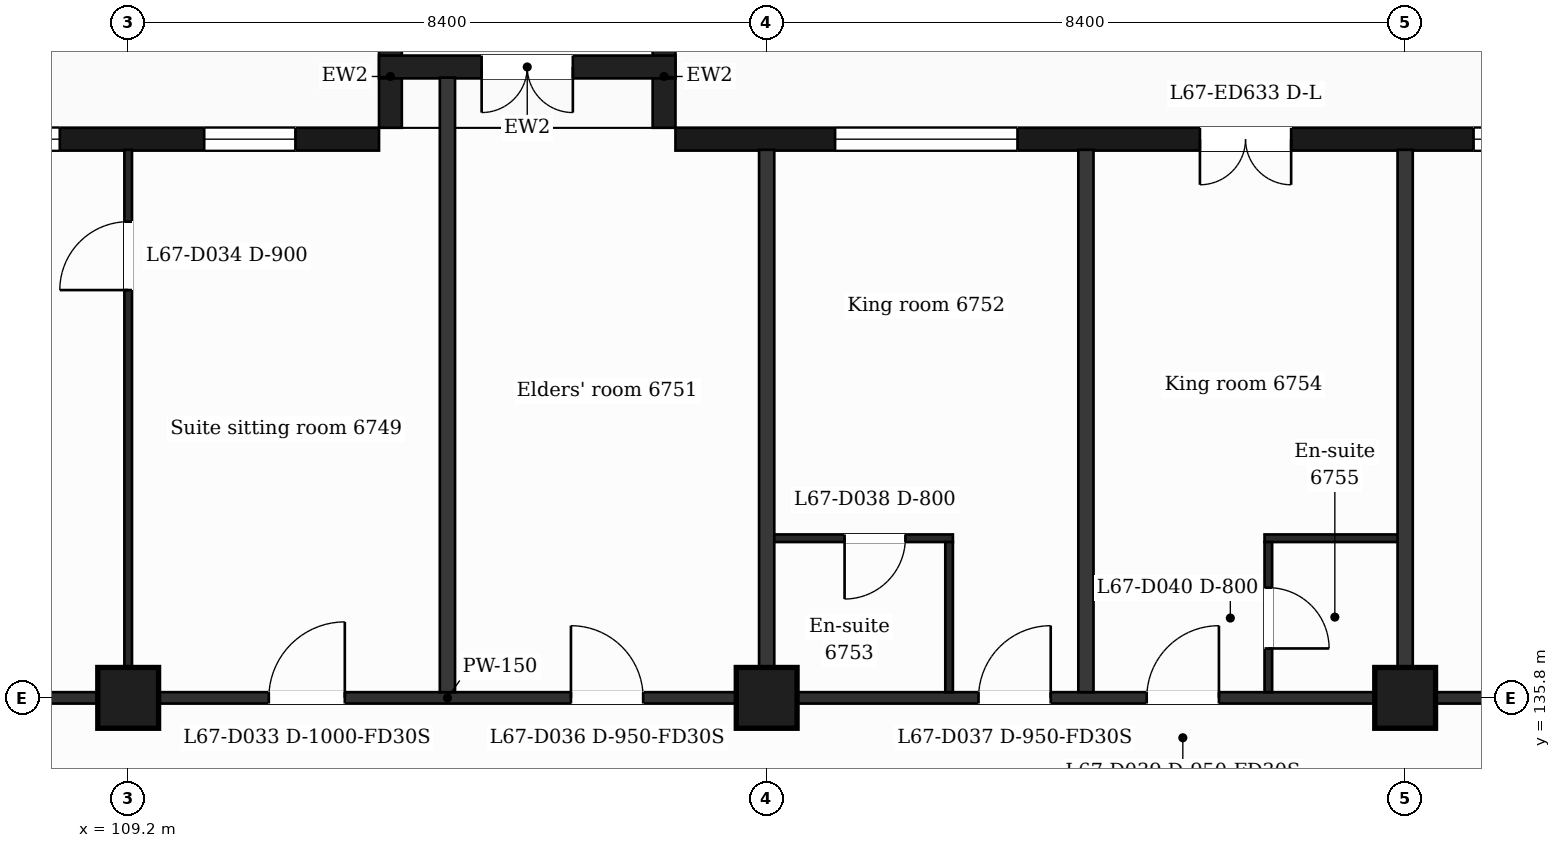
"""IFC4 building model, lengths in metres.
Left out: names, types, materials, properties, quantities, classifications, styles, units other than length and angle.
Written with IfcOpenShell. Run it as: python <this file> out.ifc"""

import sys

from ifc_helpers import new_model, si_unit, direction, frame, frame_2d, origin, origin_2d, place, context, subcontext, project, spatial, rectangle, extrude, element, fill, save


model = new_model("IFC4")
c1 = context("Model", 3, precision=1e-05, world=origin(), true_north=direction((0.0, 1.0)))
c2 = subcontext(c1, "Body", "Model", "MODEL_VIEW")
j1 = project(units=[si_unit("LENGTHUNIT", "METRE"), si_unit("PLANEANGLEUNIT", "RADIAN")], contexts=[c1])
p1 = place(None, origin())
s1 = spatial("IfcSite", under=j1, at=p1, CompositionType="ELEMENT")
p2 = place(p1, origin())
s2 = spatial("IfcBuilding", under=s1, at=p2, CompositionType="ELEMENT")
p3 = place(p2, frame((0.0, 0.0, 277.5)))
s3 = spatial("IfcBuildingStorey", under=s2, at=p3, CompositionType="ELEMENT", Elevation=277.5)
for number, where, z_axis, x_axis in (
    (1, (109.2, 135.8, 0.0), (0.0, 0.0, 1.0), (1.0, 0.0, 0.0)),
    (2, (117.6, 135.8, 0.0), (0.0, 0.0, 1.0), (1.0, 0.0, 0.0)),
    (3, (126.0, 135.8, 0.0), (0.0, 0.0, 1.0), (1.0, 0.0, 0.0)),
):
    element("IfcColumn", number, at=place(p3, frame(where, z_axis=z_axis, x_axis=x_axis)), inside=s3, PredefinedType="COLUMN", context=c2, shape_type="SweptSolid", body=[
        extrude(rectangle(XDim=0.8, YDim=0.8, at=origin_2d()), origin(), (0.0, 0.0, 1.0), 3.7),
    ])
p4 = place(p3, frame((130.65, 143.15, 0.0), z_axis=(0.0, 0.0, 1.0), x_axis=(-1.0, 0.0, 0.0)))
e4 = element("IfcWall", 4, at=p4, inside=s3, PredefinedType="SOLIDWALL", context=c2, shape_type="SweptSolid", body=[
    extrude(rectangle(XDim=14.25, YDim=0.3, at=frame_2d((7.125, 0.0))), origin(), (0.0, 0.0, 1.0), 3.38),
])
p5 = place(p4, frame((1.35, 0.0, 0.9)))
e5 = element("IfcOpeningElement", 5, at=p5, cuts=e4, PredefinedType="OPENING", context=c2, shape_type="SweptSolid", body=[
    extrude(rectangle(XDim=2.4, YDim=2.1, at=frame_2d((1.2, 1.05))), frame((0.0, 0.16, 0.0), z_axis=(0.0, -1.0, 0.0), x_axis=(1.0, 0.0, 0.0)), (0.0, 0.0, 1.0), 0.32),
])
p6 = place(p4, frame((6.15, 0.0, 0.0)))
e6 = element("IfcOpeningElement", 6, at=p6, cuts=e4, PredefinedType="OPENING", context=c2, shape_type="SweptSolid", body=[
    extrude(rectangle(XDim=1.2, YDim=2.4, at=frame_2d((0.6, 1.2))), frame((0.0, 0.16, 0.0), z_axis=(0.0, -1.0, 0.0), x_axis=(1.0, 0.0, 0.0)), (0.0, 0.0, 1.0), 0.32),
])
p7 = place(p4, frame((9.75, 0.0, 0.9)))
e7 = element("IfcOpeningElement", 7, at=p7, cuts=e4, PredefinedType="OPENING", context=c2, shape_type="SweptSolid", body=[
    extrude(rectangle(XDim=2.4, YDim=2.1, at=frame_2d((1.2, 1.05))), frame((0.0, 0.16, 0.0), z_axis=(0.0, -1.0, 0.0), x_axis=(1.0, 0.0, 0.0)), (0.0, 0.0, 1.0), 0.32),
])
p8 = place(p3, frame((112.5, 143.15, 0.0), z_axis=(0.0, 0.0, 1.0), x_axis=(-1.0, 0.0, 0.0)))
e8 = element("IfcWall", 8, at=p8, inside=s3, PredefinedType="SOLIDWALL", context=c2, shape_type="SweptSolid", body=[
    extrude(rectangle(XDim=16.5, YDim=0.3, at=frame_2d((8.25, 0.0))), origin(), (0.0, 0.0, 1.0), 3.38),
])
p9 = place(p8, frame((1.1, 0.0, 0.9)))
e9 = element("IfcOpeningElement", 9, at=p9, cuts=e8, PredefinedType="OPENING", context=c2, shape_type="SweptSolid", body=[
    extrude(rectangle(XDim=1.2, YDim=2.1, at=frame_2d((0.6, 1.05))), frame((0.0, 0.16, 0.0), z_axis=(0.0, -1.0, 0.0), x_axis=(1.0, 0.0, 0.0)), (0.0, 0.0, 1.0), 0.32),
])
p10 = place(p8, frame((4.2, 0.0, 0.9)))
e10 = element("IfcOpeningElement", 10, at=p10, cuts=e8, PredefinedType="OPENING", context=c2, shape_type="SweptSolid", body=[
    extrude(rectangle(XDim=2.4, YDim=2.1, at=frame_2d((1.2, 1.05))), frame((0.0, 0.16, 0.0), z_axis=(0.0, -1.0, 0.0), x_axis=(1.0, 0.0, 0.0)), (0.0, 0.0, 1.0), 0.32),
])
p11 = place(p8, frame((8.4, 0.0, 0.9)))
e11 = element("IfcOpeningElement", 11, at=p11, cuts=e8, PredefinedType="OPENING", context=c2, shape_type="SweptSolid", body=[
    extrude(rectangle(XDim=2.4, YDim=2.1, at=frame_2d((1.2, 1.05))), frame((0.0, 0.16, 0.0), z_axis=(0.0, -1.0, 0.0), x_axis=(1.0, 0.0, 0.0)), (0.0, 0.0, 1.0), 0.32),
])
p12 = place(p8, frame((12.3, 0.0, 0.0)))
e12 = element("IfcOpeningElement", 12, at=p12, cuts=e8, PredefinedType="OPENING", context=c2, shape_type="SweptSolid", body=[
    extrude(rectangle(XDim=1.2, YDim=2.4, at=frame_2d((0.6, 1.2))), frame((0.0, 0.16, 0.0), z_axis=(0.0, -1.0, 0.0), x_axis=(1.0, 0.0, 0.0)), (0.0, 0.0, 1.0), 0.32),
])
p13 = place(p8, frame((14.1, 0.0, 0.9)))
e13 = element("IfcOpeningElement", 13, at=p13, cuts=e8, PredefinedType="OPENING", context=c2, shape_type="SweptSolid", body=[
    extrude(rectangle(XDim=1.2, YDim=2.1, at=frame_2d((0.6, 1.05))), frame((0.0, 0.16, 0.0), z_axis=(0.0, -1.0, 0.0), x_axis=(1.0, 0.0, 0.0)), (0.0, 0.0, 1.0), 0.32),
])
for number, where, z_axis, x_axis in (
    (14, (116.25, 143.3, 0.0), (0.0, 0.0, 1.0), (0.0, 1.0, 0.0)),
    (15, (112.65, 143.3, 0.0), (0.0, 0.0, 1.0), (0.0, 1.0, 0.0)),
):
    element("IfcWall", number, at=place(p3, frame(where, z_axis=z_axis, x_axis=x_axis)), inside=s3, PredefinedType="SOLIDWALL", context=c2, shape_type="SweptSolid", body=[
        extrude(rectangle(XDim=1.35, YDim=0.3, at=frame_2d((0.675, 0.0))), origin(), (0.0, 0.0, 1.0), 3.38),
    ])
p14 = place(p3, frame((116.4, 144.1, 0.0), z_axis=(0.0, 0.0, 1.0), x_axis=(-1.0, 0.0, 0.0)))
e16 = element("IfcWall", 16, at=p14, inside=s3, PredefinedType="SOLIDWALL", context=c2, shape_type="SweptSolid", body=[
    extrude(rectangle(XDim=3.9, YDim=0.3, at=frame_2d((1.95, 0.0))), origin(), (0.0, 0.0, 1.0), 3.38),
])
p15 = place(p14, frame((1.35, 0.0, 0.0)))
e17 = element("IfcOpeningElement", 17, at=p15, cuts=e16, PredefinedType="OPENING", context=c2, shape_type="SweptSolid", body=[
    extrude(rectangle(XDim=1.2, YDim=2.4, at=frame_2d((0.6, 1.2))), frame((0.0, 0.16, 0.0), z_axis=(0.0, -1.0, 0.0), x_axis=(1.0, 0.0, 0.0)), (0.0, 0.0, 1.0), 0.32),
])
p16 = place(p3, frame((90.895, 135.8, 0.0), z_axis=(0.0, 0.0, 1.0), x_axis=(1.0, 0.0, 0.0)))
e18 = element("IfcWall", 18, at=p16, inside=s3, PredefinedType="PARTITIONING", context=c2, shape_type="SweptSolid", body=[
    extrude(rectangle(XDim=45.011, YDim=0.15, at=frame_2d((22.505, 0.0))), origin(), (0.0, 0.0, 1.0), 3.38),
])
p17 = place(p16, frame((8.005, 0.0, 0.0)))
e19 = element("IfcOpeningElement", 19, at=p17, cuts=e18, PredefinedType="OPENING", context=c2, shape_type="SweptSolid", body=[
    extrude(rectangle(XDim=1.0, YDim=2.1, at=frame_2d((0.5, 1.05))), frame((0.0, 0.085, 0.0), z_axis=(0.0, -1.0, 0.0), x_axis=(1.0, 0.0, 0.0)), (0.0, 0.0, 1.0), 0.17),
])
p18 = place(p16, frame((10.515, 0.0, 0.0)))
e20 = element("IfcOpeningElement", 20, at=p18, cuts=e18, PredefinedType="OPENING", context=c2, shape_type="SweptSolid", body=[
    extrude(rectangle(XDim=1.0, YDim=2.1, at=frame_2d((0.5, 1.05))), frame((0.0, 0.085, 0.0), z_axis=(0.0, -1.0, 0.0), x_axis=(1.0, 0.0, 0.0)), (0.0, 0.0, 1.0), 0.17),
])
p19 = place(p16, frame((20.156, 0.0, 0.0)))
e21 = element("IfcOpeningElement", 21, at=p19, cuts=e18, PredefinedType="OPENING", context=c2, shape_type="SweptSolid", body=[
    extrude(rectangle(XDim=1.0, YDim=2.1, at=frame_2d((0.5, 1.05))), frame((0.0, 0.085, 0.0), z_axis=(0.0, -1.0, 0.0), x_axis=(1.0, 0.0, 0.0)), (0.0, 0.0, 1.0), 0.17),
])
p20 = place(p16, frame((24.13, 0.0, 0.0)))
e22 = element("IfcOpeningElement", 22, at=p20, cuts=e18, PredefinedType="OPENING", context=c2, shape_type="SweptSolid", body=[
    extrude(rectangle(XDim=0.95, YDim=2.1, at=frame_2d((0.475, 1.05))), frame((0.0, 0.085, 0.0), z_axis=(0.0, -1.0, 0.0), x_axis=(1.0, 0.0, 0.0)), (0.0, 0.0, 1.0), 0.17),
])
p21 = place(p16, frame((29.492, 0.0, 0.0)))
e23 = element("IfcOpeningElement", 23, at=p21, cuts=e18, PredefinedType="OPENING", context=c2, shape_type="SweptSolid", body=[
    extrude(rectangle(XDim=0.95, YDim=2.1, at=frame_2d((0.475, 1.05))), frame((0.0, 0.085, 0.0), z_axis=(0.0, -1.0, 0.0), x_axis=(1.0, 0.0, 0.0)), (0.0, 0.0, 1.0), 0.17),
])
p22 = place(p16, frame((31.705, 0.0, 0.0)))
e24 = element("IfcOpeningElement", 24, at=p22, cuts=e18, PredefinedType="OPENING", context=c2, shape_type="SweptSolid", body=[
    extrude(rectangle(XDim=0.95, YDim=2.1, at=frame_2d((0.475, 1.05))), frame((0.0, 0.085, 0.0), z_axis=(0.0, -1.0, 0.0), x_axis=(1.0, 0.0, 0.0)), (0.0, 0.0, 1.0), 0.17),
])
p23 = place(p16, frame((39.814, 0.0, 0.0)))
e25 = element("IfcOpeningElement", 25, at=p23, cuts=e18, PredefinedType="OPENING", context=c2, shape_type="SweptSolid", body=[
    extrude(rectangle(XDim=0.95, YDim=2.1, at=frame_2d((0.475, 1.05))), frame((0.0, 0.085, 0.0), z_axis=(0.0, -1.0, 0.0), x_axis=(1.0, 0.0, 0.0)), (0.0, 0.0, 1.0), 0.17),
])
p24 = place(p3, frame((117.6, 137.9, 0.0), z_axis=(0.0, 0.0, 1.0), x_axis=(1.0, 0.0, 0.0)))
e26 = element("IfcWall", 26, at=p24, inside=s3, PredefinedType="PARTITIONING", context=c2, shape_type="SweptSolid", body=[
    extrude(rectangle(XDim=2.45, YDim=0.1, at=frame_2d((1.225, 0.0))), origin(), (0.0, 0.0, 1.0), 3.38),
])
p25 = place(p24, frame((1.025, 0.0, 0.0)))
e27 = element("IfcOpeningElement", 27, at=p25, cuts=e26, PredefinedType="OPENING", context=c2, shape_type="SweptSolid", body=[
    extrude(rectangle(XDim=0.8, YDim=2.1, at=frame_2d((0.4, 1.05))), frame((0.0, 0.06, 0.0), z_axis=(0.0, -1.0, 0.0), x_axis=(1.0, 0.0, 0.0)), (0.0, 0.0, 1.0), 0.12),
])
p26 = place(p3, frame((124.15, 137.9, 0.0), z_axis=(0.0, 0.0, 1.0), x_axis=(1.0, 0.0, 0.0)))
e28 = element("IfcWall", 28, at=p26, inside=s3, PredefinedType="PARTITIONING", context=c2, shape_type="SweptSolid", body=[
    extrude(rectangle(XDim=1.85, YDim=0.1, at=frame_2d((0.925, 0.0))), origin(), (0.0, 0.0, 1.0), 3.38),
])
p27 = place(p3, frame((109.2, 135.875, 0.0), z_axis=(0.0, 0.0, 1.0), x_axis=(0.0, 1.0, 0.0)))
e29 = element("IfcWall", 29, at=p27, inside=s3, PredefinedType="PARTITIONING", context=c2, shape_type="SweptSolid", body=[
    extrude(rectangle(XDim=7.135, YDim=0.1, at=frame_2d((3.567, 0.0))), origin(), (0.0, 0.0, 1.0), 3.38),
])
p28 = place(p27, frame((5.29, 0.0, 0.0)))
e30 = element("IfcOpeningElement", 30, at=p28, cuts=e29, PredefinedType="OPENING", context=c2, shape_type="SweptSolid", body=[
    extrude(rectangle(XDim=0.9, YDim=2.1, at=frame_2d((0.45, 1.05))), frame((0.0, 0.06, 0.0), z_axis=(0.0, -1.0, 0.0), x_axis=(1.0, 0.0, 0.0)), (0.0, 0.0, 1.0), 0.12),
])
p29 = place(p3, frame((113.4, 135.875, 0.0), z_axis=(0.0, 0.0, 1.0), x_axis=(0.0, 1.0, 0.0)))
e31 = element("IfcWall", 31, at=p29, inside=s3, PredefinedType="PARTITIONING", context=c2, shape_type="SweptSolid", body=[
    extrude(rectangle(XDim=8.085, YDim=0.2, at=frame_2d((4.042, 0.0))), origin(), (0.0, 0.0, 1.0), 3.38),
])
p30 = place(p3, frame((117.6, 135.875, 0.0), z_axis=(0.0, 0.0, 1.0), x_axis=(0.0, 1.0, 0.0)))
e32 = element("IfcWall", 32, at=p30, inside=s3, PredefinedType="PARTITIONING", context=c2, shape_type="SweptSolid", body=[
    extrude(rectangle(XDim=7.135, YDim=0.2, at=frame_2d((3.567, 0.0))), origin(), (0.0, 0.0, 1.0), 3.38),
])
p31 = place(p3, frame((120.0, 135.875, 0.0), z_axis=(0.0, 0.0, 1.0), x_axis=(0.0, 1.0, 0.0)))
e33 = element("IfcWall", 33, at=p31, inside=s3, PredefinedType="PARTITIONING", context=c2, shape_type="SweptSolid", body=[
    extrude(rectangle(XDim=1.975, YDim=0.1, at=frame_2d((0.988, 0.0))), origin(), (0.0, 0.0, 1.0), 3.38),
])
p32 = place(p3, frame((121.8, 135.875, 0.0), z_axis=(0.0, 0.0, 1.0), x_axis=(0.0, 1.0, 0.0)))
e34 = element("IfcWall", 34, at=p32, inside=s3, PredefinedType="PARTITIONING", context=c2, shape_type="SweptSolid", body=[
    extrude(rectangle(XDim=7.135, YDim=0.2, at=frame_2d((3.567, 0.0))), origin(), (0.0, 0.0, 1.0), 3.38),
])
p33 = place(p3, frame((124.2, 135.875, 0.0), z_axis=(0.0, 0.0, 1.0), x_axis=(0.0, 1.0, 0.0)))
e35 = element("IfcWall", 35, at=p33, inside=s3, PredefinedType="PARTITIONING", context=c2, shape_type="SweptSolid", body=[
    extrude(rectangle(XDim=1.975, YDim=0.1, at=frame_2d((0.988, 0.0))), origin(), (0.0, 0.0, 1.0), 3.38),
])
p34 = place(p33, frame((0.575, 0.0, 0.0)))
e36 = element("IfcOpeningElement", 36, at=p34, cuts=e35, PredefinedType="OPENING", context=c2, shape_type="SweptSolid", body=[
    extrude(rectangle(XDim=0.8, YDim=2.1, at=frame_2d((0.4, 1.05))), frame((0.0, 0.06, 0.0), z_axis=(0.0, -1.0, 0.0), x_axis=(1.0, 0.0, 0.0)), (0.0, 0.0, 1.0), 0.12),
])
p35 = place(p3, frame((126.0, 135.875, 0.0), z_axis=(0.0, 0.0, 1.0), x_axis=(0.0, 1.0, 0.0)))
e37 = element("IfcWall", 37, at=p35, inside=s3, PredefinedType="PARTITIONING", context=c2, shape_type="SweptSolid", body=[
    extrude(rectangle(XDim=7.135, YDim=0.2, at=frame_2d((3.567, 0.0))), origin(), (0.0, 0.0, 1.0), 3.38),
])
p36 = place(p5, origin())
e38 = element("IfcWindow", 38, at=p36, inside=s3, PartitioningType="SINGLE_PANEL", PredefinedType="WINDOW", context=c2, shape_type="SweptSolid", body=[
    extrude(rectangle(XDim=2.4, YDim=2.1, at=frame_2d((1.2, 1.05))), frame((0.0, 0.03, 0.0), z_axis=(0.0, -1.0, 0.0), x_axis=(1.0, 0.0, 0.0)), (0.0, 0.0, 1.0), 0.06),
])
fill(e5, e38)
p37 = place(p6, origin())
e39 = element("IfcDoor", 39, at=p37, inside=s3, OperationType="DOUBLE_DOOR_SINGLE_SWING", PredefinedType="DOOR", context=c2, shape_type="SweptSolid", body=[
    extrude(rectangle(XDim=1.2, YDim=2.4, at=frame_2d((0.6, 1.2))), frame((0.0, 0.025, 0.0), z_axis=(0.0, -1.0, 0.0), x_axis=(1.0, 0.0, 0.0)), (0.0, 0.0, 1.0), 0.05),
])
fill(e6, e39)
p38 = place(p7, origin())
e40 = element("IfcWindow", 40, at=p38, inside=s3, PartitioningType="SINGLE_PANEL", PredefinedType="WINDOW", context=c2, shape_type="SweptSolid", body=[
    extrude(rectangle(XDim=2.4, YDim=2.1, at=frame_2d((1.2, 1.05))), frame((0.0, 0.03, 0.0), z_axis=(0.0, -1.0, 0.0), x_axis=(1.0, 0.0, 0.0)), (0.0, 0.0, 1.0), 0.06),
])
fill(e7, e40)
p39 = place(p9, origin())
e41 = element("IfcWindow", 41, at=p39, inside=s3, PartitioningType="SINGLE_PANEL", PredefinedType="WINDOW", context=c2, shape_type="SweptSolid", body=[
    extrude(rectangle(XDim=1.2, YDim=2.1, at=frame_2d((0.6, 1.05))), frame((0.0, 0.03, 0.0), z_axis=(0.0, -1.0, 0.0), x_axis=(1.0, 0.0, 0.0)), (0.0, 0.0, 1.0), 0.06),
])
fill(e9, e41)
p40 = place(p10, origin())
e42 = element("IfcWindow", 42, at=p40, inside=s3, PartitioningType="SINGLE_PANEL", PredefinedType="WINDOW", context=c2, shape_type="SweptSolid", body=[
    extrude(rectangle(XDim=2.4, YDim=2.1, at=frame_2d((1.2, 1.05))), frame((0.0, 0.03, 0.0), z_axis=(0.0, -1.0, 0.0), x_axis=(1.0, 0.0, 0.0)), (0.0, 0.0, 1.0), 0.06),
])
fill(e10, e42)
p41 = place(p15, origin())
e43 = element("IfcDoor", 43, at=p41, inside=s3, OperationType="DOUBLE_DOOR_SINGLE_SWING", PredefinedType="DOOR", context=c2, shape_type="SweptSolid", body=[
    extrude(rectangle(XDim=1.2, YDim=2.4, at=frame_2d((0.6, 1.2))), frame((0.0, 0.025, 0.0), z_axis=(0.0, -1.0, 0.0), x_axis=(1.0, 0.0, 0.0)), (0.0, 0.0, 1.0), 0.05),
])
fill(e17, e43)
p42 = place(p19, origin())
e44 = element("IfcDoor", 44, at=p42, inside=s3, OperationType="SINGLE_SWING_RIGHT", PredefinedType="DOOR", context=c2, shape_type="SweptSolid", body=[
    extrude(rectangle(XDim=1.0, YDim=2.1, at=frame_2d((0.5, 1.05))), frame((0.0, 0.025, 0.0), z_axis=(0.0, -1.0, 0.0), x_axis=(1.0, 0.0, 0.0)), (0.0, 0.0, 1.0), 0.05),
])
fill(e21, e44)
p43 = place(p28, origin())
e45 = element("IfcDoor", 45, at=p43, inside=s3, OperationType="SINGLE_SWING_LEFT", PredefinedType="DOOR", context=c2, shape_type="SweptSolid", body=[
    extrude(rectangle(XDim=0.9, YDim=2.1, at=frame_2d((0.45, 1.05))), frame((0.0, 0.025, 0.0), z_axis=(0.0, -1.0, 0.0), x_axis=(1.0, 0.0, 0.0)), (0.0, 0.0, 1.0), 0.05),
])
fill(e30, e45)
p44 = place(p20, origin())
e46 = element("IfcDoor", 46, at=p44, inside=s3, OperationType="SINGLE_SWING_LEFT", PredefinedType="DOOR", context=c2, shape_type="SweptSolid", body=[
    extrude(rectangle(XDim=0.95, YDim=2.1, at=frame_2d((0.475, 1.05))), frame((0.0, 0.025, 0.0), z_axis=(0.0, -1.0, 0.0), x_axis=(1.0, 0.0, 0.0)), (0.0, 0.0, 1.0), 0.05),
])
fill(e22, e46)
p45 = place(p21, origin())
e47 = element("IfcDoor", 47, at=p45, inside=s3, OperationType="SINGLE_SWING_RIGHT", PredefinedType="DOOR", context=c2, shape_type="SweptSolid", body=[
    extrude(rectangle(XDim=0.95, YDim=2.1, at=frame_2d((0.475, 1.05))), frame((0.0, 0.025, 0.0), z_axis=(0.0, -1.0, 0.0), x_axis=(1.0, 0.0, 0.0)), (0.0, 0.0, 1.0), 0.05),
])
fill(e23, e47)
p46 = place(p25, origin())
e48 = element("IfcDoor", 48, at=p46, inside=s3, OperationType="SINGLE_SWING_LEFT", PredefinedType="DOOR", context=c2, shape_type="SweptSolid", body=[
    extrude(rectangle(XDim=0.8, YDim=2.1, at=frame_2d((0.4, 1.05))), frame((0.0, 0.025, 0.0), z_axis=(0.0, -1.0, 0.0), x_axis=(1.0, 0.0, 0.0)), (0.0, 0.0, 1.0), 0.05),
])
fill(e27, e48)
p47 = place(p22, origin())
e49 = element("IfcDoor", 49, at=p47, inside=s3, OperationType="SINGLE_SWING_RIGHT", PredefinedType="DOOR", context=c2, shape_type="SweptSolid", body=[
    extrude(rectangle(XDim=0.95, YDim=2.1, at=frame_2d((0.475, 1.05))), frame((0.0, 0.025, 0.0), z_axis=(0.0, -1.0, 0.0), x_axis=(1.0, 0.0, 0.0)), (0.0, 0.0, 1.0), 0.05),
])
fill(e24, e49)
p48 = place(p34, origin())
e50 = element("IfcDoor", 50, at=p48, inside=s3, OperationType="SINGLE_SWING_LEFT", PredefinedType="DOOR", context=c2, shape_type="SweptSolid", body=[
    extrude(rectangle(XDim=0.8, YDim=2.1, at=frame_2d((0.4, 1.05))), frame((0.0, 0.025, 0.0), z_axis=(0.0, -1.0, 0.0), x_axis=(1.0, 0.0, 0.0)), (0.0, 0.0, 1.0), 0.05),
])
fill(e36, e50)
save(model, sys.argv[1])
